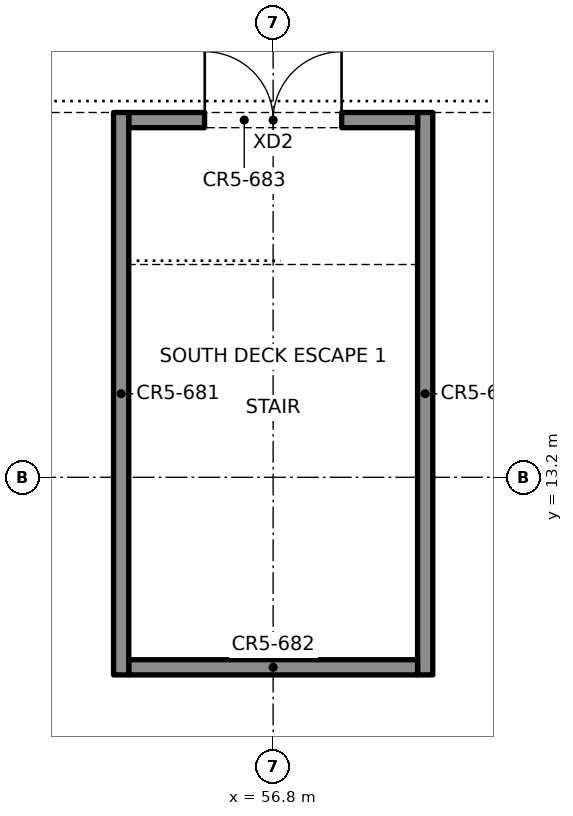
"""IFC4 building model, lengths in metres.
Left out: names, types, materials, properties, quantities, classifications, styles, units other than length and angle.
Written with IfcOpenShell. Run it as: python <this file> out.ifc"""

import sys

from ifc_helpers import new_model, si_unit, direction, frame, frame_2d, origin, place, context, subcontext, project, spatial, rectangle, extrude, element, fill, save


model = new_model("IFC4")
c1 = context("Model", 3, precision=1e-05, world=origin(), true_north=direction((0.0, 1.0)))
c2 = subcontext(c1, "Body", "Model", "MODEL_VIEW")
j1 = project(units=[si_unit("LENGTHUNIT", "METRE"), si_unit("PLANEANGLEUNIT", "RADIAN")], contexts=[c1])
p1 = place(None, origin())
s1 = spatial("IfcSite", under=j1, at=p1, CompositionType="ELEMENT")
p2 = place(p1, origin())
s2 = spatial("IfcBuilding", under=s1, at=p2, CompositionType="ELEMENT")
p3 = place(p2, frame((0.0, 0.0, 14.0)))
s3 = spatial("IfcBuildingStorey", under=s2, at=p3, CompositionType="ELEMENT", Elevation=14.0)
for number, where, z_axis, x_axis in (
    (1, (54.8, 10.6, 0.0), (0.0, 0.0, 1.0), (0.0, 1.0, 0.0)),
    (2, (58.8, 18.0, 0.0), (0.0, 0.0, 1.0), (0.0, -1.0, 0.0)),
):
    element("IfcWall", number, at=place(p3, frame(where, z_axis=z_axis, x_axis=x_axis)), inside=s3, PredefinedType="SOLIDWALL", context=c2, shape_type="SweptSolid", body=[
        extrude(rectangle(XDim=7.4, YDim=0.2, at=frame_2d((3.7, 0.0))), origin(), (0.0, 0.0, 1.0), 3.0),
    ])
p4 = place(p3, frame((54.9, 10.7, 0.0), z_axis=(0.0, 0.0, 1.0), x_axis=(1.0, 0.0, 0.0)))
e3 = element("IfcWall", 3, at=p4, inside=s3, PredefinedType="SOLIDWALL", context=c2, shape_type="SweptSolid", body=[
    extrude(rectangle(XDim=3.8, YDim=0.2, at=frame_2d((1.9, 0.0))), origin(), (0.0, 0.0, 1.0), 3.0),
])
p5 = place(p3, frame((54.9, 17.9, 0.0), z_axis=(0.0, 0.0, 1.0), x_axis=(1.0, 0.0, 0.0)))
e4 = element("IfcWall", 4, at=p5, inside=s3, PredefinedType="SOLIDWALL", context=c2, shape_type="SweptSolid", body=[
    extrude(rectangle(XDim=3.8, YDim=0.2, at=frame_2d((1.9, 0.0))), origin(), (0.0, 0.0, 1.0), 3.0),
])
p6 = place(p5, frame((1.0, 0.0, 0.0)))
e5 = element("IfcOpeningElement", 5, at=p6, cuts=e4, PredefinedType="OPENING", context=c2, shape_type="SweptSolid", body=[
    extrude(rectangle(XDim=1.8, YDim=2.1, at=frame_2d((0.9, 1.05))), frame((0.0, 0.11, 0.0), z_axis=(0.0, -1.0, 0.0), x_axis=(1.0, 0.0, 0.0)), (0.0, 0.0, 1.0), 0.22),
])
p7 = place(p6, origin())
e6 = element("IfcDoor", 6, at=p7, inside=s3, OperationType="DOUBLE_DOOR_SINGLE_SWING", PredefinedType="DOOR", context=c2, shape_type="SweptSolid", body=[
    extrude(rectangle(XDim=1.8, YDim=2.1, at=frame_2d((0.9, 1.05))), frame((0.0, 0.025, 0.0), z_axis=(0.0, -1.0, 0.0), x_axis=(1.0, 0.0, 0.0)), (0.0, 0.0, 1.0), 0.05),
])
fill(e5, e6)
save(model, sys.argv[1])
